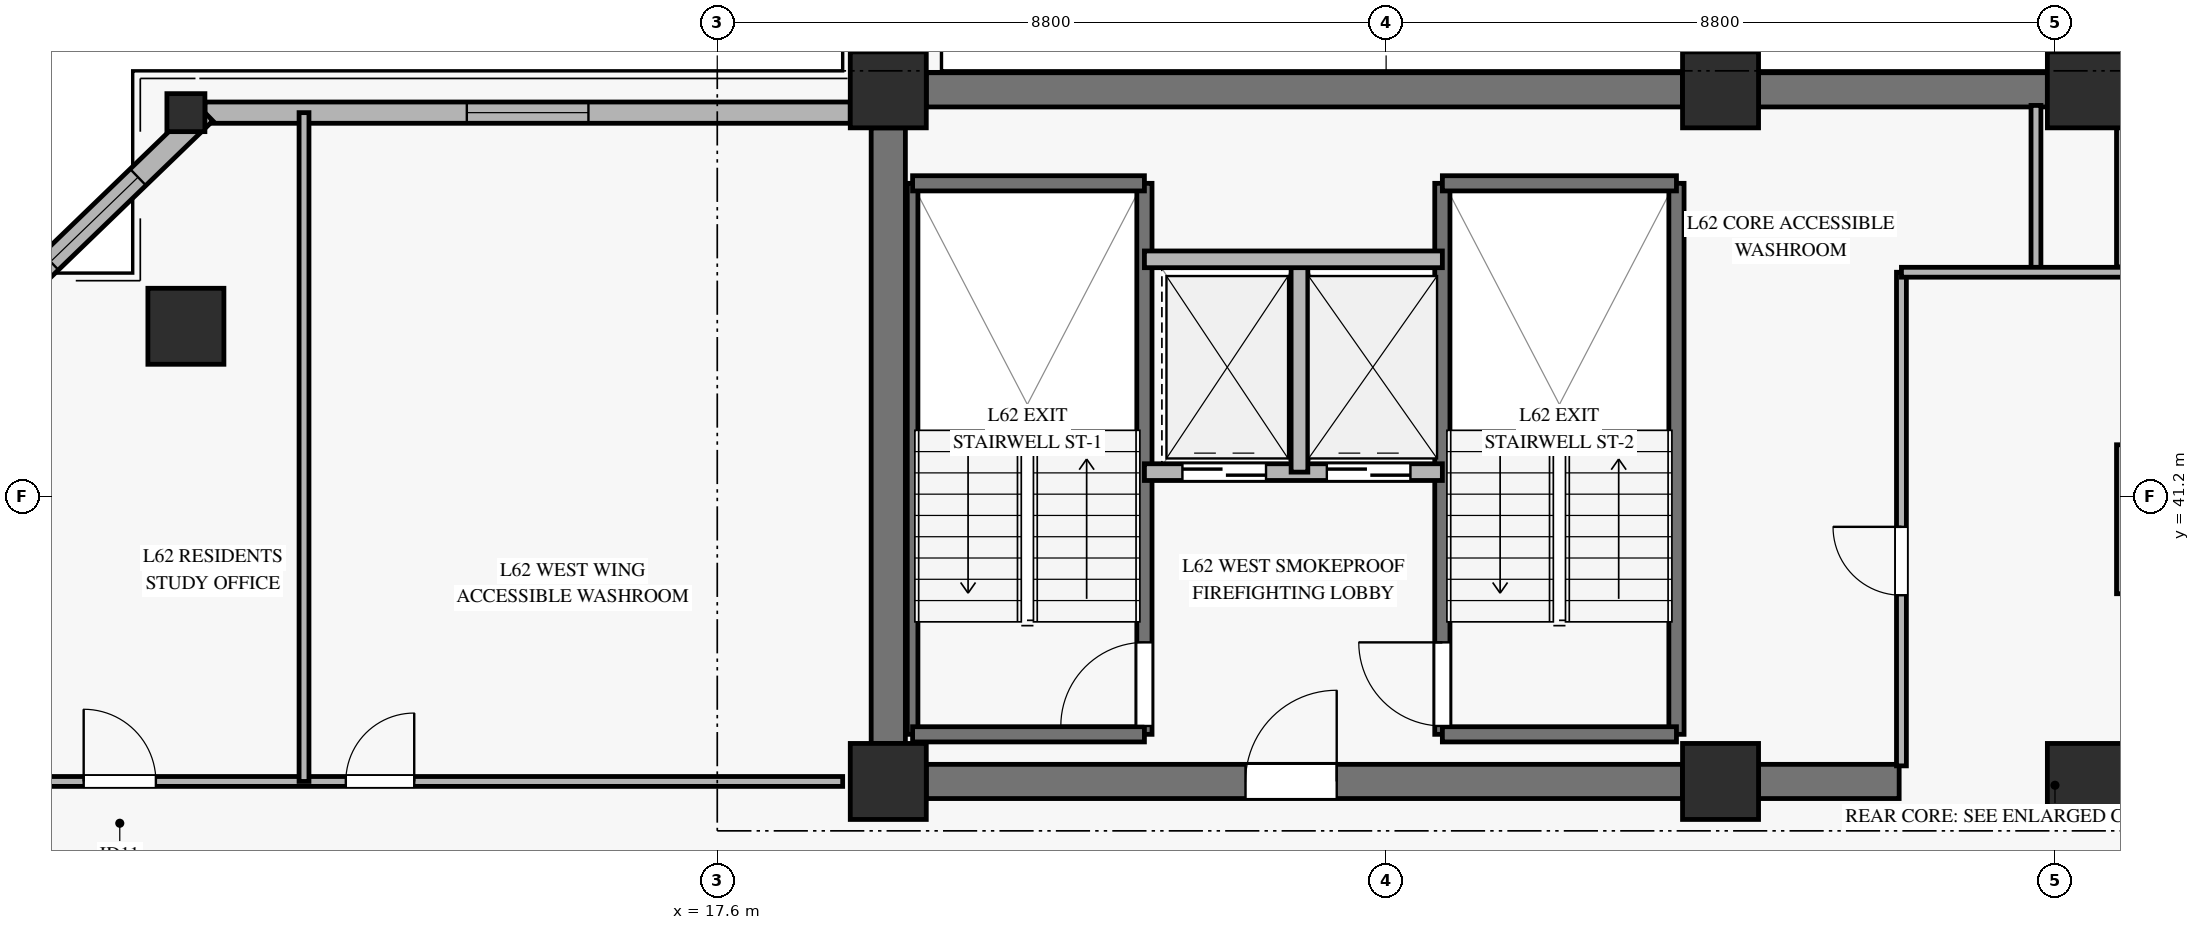
"""IFC4 building model, lengths in metres.
Left out: names, types, materials, properties, quantities, classifications, styles, units other than length and angle.
Written with IfcOpenShell. Run it as: python <this file> out.ifc"""

import sys

from ifc_helpers import new_model, si_unit, direction, frame, frame_2d, origin, origin_2d, place, context, subcontext, project, spatial, rectangle, hollow_rectangle, extrude, source, transform, mapped, element, fill, save


model = new_model("IFC4")
c1 = context("Model", 3, precision=1e-05, world=origin(), true_north=direction((0.0, 1.0)))
c2 = subcontext(c1, "Body", "Model", "MODEL_VIEW")
j1 = project(units=[si_unit("LENGTHUNIT", "METRE"), si_unit("PLANEANGLEUNIT", "RADIAN")], contexts=[c1])
p1 = place(None, origin())
s1 = spatial("IfcSite", under=j1, at=p1, CompositionType="ELEMENT")
p2 = place(p1, origin())
s2 = spatial("IfcBuilding", under=s1, at=p2, CompositionType="ELEMENT")
p3 = place(p2, frame((0.0, 0.0, 245.1)))
s3 = spatial("IfcBuildingStorey", under=s2, at=p3, CompositionType="ELEMENT", Elevation=245.1)
m1 = source(origin(), c2, "Body", "SweptSolid", [
    extrude(rectangle(XDim=1.0, YDim=1.0, at=origin_2d()), origin(), (0.0, 0.0, 1.0), 3.185),
])
for number, where, z_axis, x_axis in (
    (1, (19.85, 37.45, 0.0), (0.0, 0.0, 1.0), (1.0, 0.0, 0.0)),
    (2, (19.85, 46.55, 0.0), (0.0, 0.0, 1.0), (1.0, 0.0, 0.0)),
    (3, (30.8, 37.45, 0.0), (0.0, 0.0, 1.0), (1.0, 0.0, 0.0)),
    (4, (30.8, 46.55, 0.0), (0.0, 0.0, 1.0), (1.0, 0.0, 0.0)),
    (5, (35.6, 37.45, 0.0), (0.0, 0.0, 1.0), (1.0, 0.0, 0.0)),
    (6, (35.6, 46.55, 0.0), (0.0, 0.0, 1.0), (1.0, 0.0, 0.0)),
):
    element("IfcColumn", number, at=place(p3, frame(where, z_axis=z_axis, x_axis=x_axis)), inside=s3, PredefinedType="PILASTER", context=c2, shape_type="MappedRepresentation", body=[
        mapped(m1, transform((0.0, 0.0, 0.0), x_axis=(1.0, 0.0, 0.0), y_axis=(0.0, 1.0, 0.0), z_axis=(0.0, 0.0, 1.0), scale=1.0)),
    ])
p4 = place(p3, frame((20.35, 46.55, 0.0), z_axis=(0.0, 0.0, 1.0), x_axis=(1.0, 0.0, 0.0)))
e7 = element("IfcWall", 7, at=p4, inside=s3, PredefinedType="SHEAR", context=c2, shape_type="SweptSolid", body=[
    extrude(rectangle(XDim=9.95, YDim=0.45, at=frame_2d((4.975, 0.0))), origin(), (0.0, 0.0, 1.0), 3.185),
])
p5 = place(p3, frame((31.3, 46.55, 0.0), z_axis=(0.0, 0.0, 1.0), x_axis=(1.0, 0.0, 0.0)))
e8 = element("IfcWall", 8, at=p5, inside=s3, PredefinedType="SHEAR", context=c2, shape_type="SweptSolid", body=[
    extrude(rectangle(XDim=3.8, YDim=0.45, at=frame_2d((1.9, 0.0))), origin(), (0.0, 0.0, 1.0), 3.185),
])
p6 = place(p3, frame((20.35, 37.45, 0.0), z_axis=(0.0, 0.0, 1.0), x_axis=(1.0, 0.0, 0.0)))
e9 = element("IfcWall", 9, at=p6, inside=s3, PredefinedType="SHEAR", context=c2, shape_type="SweptSolid", body=[
    extrude(rectangle(XDim=9.95, YDim=0.45, at=frame_2d((4.975, 0.0))), origin(), (0.0, 0.0, 1.0), 3.185),
])
p7 = place(p6, frame((4.2, 0.0, 0.0)))
e10 = element("IfcOpeningElement", 10, at=p7, cuts=e9, PredefinedType="OPENING", context=c2, shape_type="SweptSolid", body=[
    extrude(rectangle(XDim=1.2, YDim=2.15, at=frame_2d((0.6, 1.075))), frame((0.0, 0.235, 0.0), z_axis=(0.0, -1.0, 0.0), x_axis=(1.0, 0.0, 0.0)), (0.0, 0.0, 1.0), 0.47),
])
p8 = place(p3, frame((31.3, 37.45, 0.0), z_axis=(0.0, 0.0, 1.0), x_axis=(1.0, 0.0, 0.0)))
e11 = element("IfcWall", 11, at=p8, inside=s3, PredefinedType="SHEAR", context=c2, shape_type="SweptSolid", body=[
    extrude(rectangle(XDim=1.85, YDim=0.45, at=frame_2d((0.925, 0.0))), origin(), (0.0, 0.0, 1.0), 3.185),
])
p9 = place(p3, frame((19.85, 37.95, 0.0), z_axis=(0.0, 0.0, 1.0), x_axis=(0.0, 1.0, 0.0)))
e12 = element("IfcWall", 12, at=p9, inside=s3, PredefinedType="SHEAR", context=c2, shape_type="SweptSolid", body=[
    extrude(rectangle(XDim=8.1, YDim=0.45, at=frame_2d((4.05, 0.0))), origin(), (0.0, 0.0, 1.0), 3.185),
])
m2 = source(origin(), c2, "Body", "SweptSolid", [
    extrude(hollow_rectangle(XDim=1.0, YDim=1.0, WallThickness=0.045, at=origin_2d()), origin(), (0.0, 0.0, 1.0), 3.207),
])
p10 = place(p3, frame((10.609, 43.439, 0.0), z_axis=(0.115424259294, 0.014389963725, 0.993212046499), x_axis=(-0.123712481455, 0.992318105212, 0.0)))
e13 = element("IfcColumn", 13, at=p10, inside=s3, PredefinedType="COLUMN", context=c2, shape_type="MappedRepresentation", body=[
    mapped(m2, transform((0.0, 0.0, 0.0), x_axis=(1.0, 0.0, 0.0), y_axis=(0.0, 1.0, 0.0), z_axis=(0.0, 0.0, 1.0), scale=1.0)),
])
m3 = source(origin(), c2, "Body", "SweptSolid", [
    extrude(hollow_rectangle(XDim=0.5, YDim=0.5, WallThickness=0.024, at=origin_2d()), origin(), (0.0, 0.0, 1.0), 3.206),
])
p11 = place(p3, frame((10.609, 46.25, 0.0), z_axis=(0.115436211662, 0.0, 0.993314895205), x_axis=(0.0, 1.0, 0.0)))
e14 = element("IfcColumn", 14, at=p11, inside=s3, PredefinedType="COLUMN", context=c2, shape_type="MappedRepresentation", body=[
    mapped(m3, transform((0.0, 0.0, 0.0), x_axis=(1.0, 0.0, 0.0), y_axis=(0.0, 1.0, 0.0), z_axis=(0.0, 0.0, 1.0), scale=1.0)),
])
p12 = place(p3, frame((10.859, 46.25, 0.0), z_axis=(0.0, 0.0, 1.0), x_axis=(1.0, 0.0, 0.0)))
e15 = element("IfcWall", 15, at=p12, inside=s3, PredefinedType="SOLIDWALL", context=c2, shape_type="SweptSolid", body=[
    extrude(rectangle(XDim=8.491, YDim=0.28, at=frame_2d((4.246, 0.0))), origin(), (0.0, 0.0, 1.0), 2.815),
])
p13 = place(p12, frame((3.446, 0.0, 0.45)))
e16 = element("IfcOpeningElement", 16, at=p13, cuts=e15, PredefinedType="OPENING", context=c2, shape_type="SweptSolid", body=[
    extrude(rectangle(XDim=1.6, YDim=2.0, at=frame_2d((0.8, 1.0))), frame((0.0, 0.15, 0.0), z_axis=(0.0, -1.0, 0.0), x_axis=(1.0, 0.0, 0.0)), (0.0, 0.0, 1.0), 0.3),
])
p14 = place(p3, frame((10.859, 46.25, 0.0), z_axis=(0.0, 0.0, 1.0), x_axis=(-0.719337004509, -0.694661265614, 0.0)))
e17 = element("IfcWall", 17, at=p14, inside=s3, PredefinedType="SOLIDWALL", context=c2, shape_type="SweptSolid", body=[
    extrude(rectangle(XDim=4.047, YDim=0.3, at=frame_2d((2.023, 0.0))), origin(), (0.0, 0.0, 1.0), 2.815),
])
p15 = place(p14, frame((1.223, 0.0, 0.45)))
e18 = element("IfcOpeningElement", 18, at=p15, cuts=e17, PredefinedType="OPENING", context=c2, shape_type="SweptSolid", body=[
    extrude(rectangle(XDim=1.6, YDim=2.0, at=frame_2d((0.8, 1.0))), frame((0.0, 0.16, 0.0), z_axis=(0.0, -1.0, 0.0), x_axis=(1.0, 0.0, 0.0)), (0.0, 0.0, 1.0), 0.32),
])
p16 = place(p3, frame((20.17, 38.07, 0.0), z_axis=(0.0, 0.0, 1.0), x_axis=(0.0, 1.0, 0.0)))
e19 = element("IfcWall", 19, at=p16, inside=s3, PredefinedType="SOLIDWALL", context=c2, shape_type="SweptSolid", body=[
    extrude(rectangle(XDim=7.25, YDim=0.14, at=frame_2d((3.625, 0.0))), origin(), (0.0, 0.0, 1.0), 3.4),
])
p17 = place(p3, frame((23.22, 38.07, 0.0), z_axis=(0.0, 0.0, 1.0), x_axis=(0.0, 1.0, 0.0)))
e20 = element("IfcWall", 20, at=p17, inside=s3, PredefinedType="SOLIDWALL", context=c2, shape_type="SweptSolid", body=[
    extrude(rectangle(XDim=7.25, YDim=0.2, at=frame_2d((3.625, 0.0))), origin(), (0.0, 0.0, 1.0), 3.4),
])
p18 = place(p17, frame((0.11, 0.0, 0.0)))
e21 = element("IfcOpeningElement", 21, at=p18, cuts=e20, PredefinedType="OPENING", context=c2, shape_type="SweptSolid", body=[
    extrude(rectangle(XDim=1.1, YDim=2.15, at=frame_2d((0.55, 1.075))), frame((0.0, 0.11, 0.0), z_axis=(0.0, -1.0, 0.0), x_axis=(1.0, 0.0, 0.0)), (0.0, 0.0, 1.0), 0.22),
])
for number, where, z_axis, x_axis in (
    (22, (20.17, 45.32, 0.0), (0.0, 0.0, 1.0), (1.0, 0.0, 0.0)),
    (23, (20.17, 38.07, 0.0), (0.0, 0.0, 1.0), (1.0, 0.0, 0.0)),
):
    element("IfcWall", number, at=place(p3, frame(where, z_axis=z_axis, x_axis=x_axis)), inside=s3, PredefinedType="SOLIDWALL", context=c2, shape_type="SweptSolid", body=[
        extrude(rectangle(XDim=3.05, YDim=0.2, at=frame_2d((1.525, 0.0))), origin(), (0.0, 0.0, 1.0), 3.4),
    ])
p19 = place(p3, frame((27.14, 38.07, 0.0), z_axis=(0.0, 0.0, 1.0), x_axis=(0.0, 1.0, 0.0)))
e24 = element("IfcWall", 24, at=p19, inside=s3, PredefinedType="SOLIDWALL", context=c2, shape_type="SweptSolid", body=[
    extrude(rectangle(XDim=7.25, YDim=0.2, at=frame_2d((3.625, 0.0))), origin(), (0.0, 0.0, 1.0), 3.4),
])
p20 = place(p19, frame((0.11, 0.0, 0.0)))
e25 = element("IfcOpeningElement", 25, at=p20, cuts=e24, PredefinedType="OPENING", context=c2, shape_type="SweptSolid", body=[
    extrude(rectangle(XDim=1.1, YDim=2.15, at=frame_2d((0.55, 1.075))), frame((0.0, 0.11, 0.0), z_axis=(0.0, -1.0, 0.0), x_axis=(1.0, 0.0, 0.0)), (0.0, 0.0, 1.0), 0.22),
])
p21 = place(p3, frame((30.22, 38.07, 0.0), z_axis=(0.0, 0.0, 1.0), x_axis=(0.0, 1.0, 0.0)))
e26 = element("IfcWall", 26, at=p21, inside=s3, PredefinedType="SOLIDWALL", context=c2, shape_type="SweptSolid", body=[
    extrude(rectangle(XDim=7.25, YDim=0.2, at=frame_2d((3.625, 0.0))), origin(), (0.0, 0.0, 1.0), 3.4),
])
for number, where, z_axis, x_axis in (
    (27, (27.14, 45.32, 0.0), (0.0, 0.0, 1.0), (1.0, 0.0, 0.0)),
    (28, (27.14, 38.07, 0.0), (0.0, 0.0, 1.0), (1.0, 0.0, 0.0)),
):
    element("IfcWall", number, at=place(p3, frame(where, z_axis=z_axis, x_axis=x_axis)), inside=s3, PredefinedType="SOLIDWALL", context=c2, shape_type="SweptSolid", body=[
        extrude(rectangle(XDim=3.08, YDim=0.2, at=frame_2d((1.54, 0.0))), origin(), (0.0, 0.0, 1.0), 3.4),
    ])
p22 = place(p3, frame((23.22, 41.52, 0.0), z_axis=(0.0, 0.0, 1.0), x_axis=(1.0, 0.0, 0.0)))
e29 = element("IfcWall", 29, at=p22, inside=s3, PredefinedType="SOLIDWALL", context=c2, shape_type="SweptSolid", body=[
    extrude(rectangle(XDim=3.92, YDim=0.22, at=frame_2d((1.96, 0.0))), origin(), (0.0, 0.0, 1.0), 3.185),
])
p23 = place(p22, frame((0.5, 0.0, 0.0)))
e30 = element("IfcOpeningElement", 30, at=p23, cuts=e29, PredefinedType="OPENING", context=c2, shape_type="SweptSolid", body=[
    extrude(rectangle(XDim=1.1, YDim=2.2, at=frame_2d((0.55, 1.1))), frame((0.0, 0.12, 0.0), z_axis=(0.0, -1.0, 0.0), x_axis=(1.0, 0.0, 0.0)), (0.0, 0.0, 1.0), 0.24),
])
p24 = place(p22, frame((2.4, 0.0, 0.0)))
e31 = element("IfcOpeningElement", 31, at=p24, cuts=e29, PredefinedType="OPENING", context=c2, shape_type="SweptSolid", body=[
    extrude(rectangle(XDim=1.1, YDim=2.2, at=frame_2d((0.55, 1.1))), frame((0.0, 0.12, 0.0), z_axis=(0.0, -1.0, 0.0), x_axis=(1.0, 0.0, 0.0)), (0.0, 0.0, 1.0), 0.24),
])
p25 = place(p3, frame((25.26, 41.52, 0.0), z_axis=(0.0, 0.0, 1.0), x_axis=(0.0, 1.0, 0.0)))
e32 = element("IfcWall", 32, at=p25, inside=s3, PredefinedType="SOLIDWALL", context=c2, shape_type="SweptSolid", body=[
    extrude(rectangle(XDim=2.8, YDim=0.22, at=frame_2d((1.4, 0.0))), origin(), (0.0, 0.0, 1.0), 3.185),
])
p26 = place(p3, frame((23.22, 44.32, 0.0), z_axis=(0.0, 0.0, 1.0), x_axis=(1.0, 0.0, 0.0)))
e33 = element("IfcWall", 33, at=p26, inside=s3, PredefinedType="SOLIDWALL", context=c2, shape_type="SweptSolid", body=[
    extrude(rectangle(XDim=3.92, YDim=0.22, at=frame_2d((1.96, 0.0))), origin(), (0.0, 0.0, 1.0), 3.185),
])
p27 = place(p3, frame((36.12, 39.92, 0.0), z_axis=(0.0, 0.0, 1.0), x_axis=(0.0, 1.0, 0.0)))
e34 = element("IfcWall", 34, at=p27, inside=s3, PredefinedType="SOLIDWALL", context=c2, shape_type="SweptSolid", body=[
    extrude(rectangle(XDim=1.96, YDim=0.22, at=frame_2d((0.98, 0.0))), origin(), (0.0, 0.0, 1.0), 3.185),
])
p28 = place(p3, frame((36.12, 44.22, 0.0), z_axis=(0.0, 0.0, 1.0), x_axis=(0.0, 1.0, 0.0)))
e35 = element("IfcWall", 35, at=p28, inside=s3, PredefinedType="SOLIDWALL", context=c2, shape_type="SweptSolid", body=[
    extrude(rectangle(XDim=2.125, YDim=0.22, at=frame_2d((1.062, 0.0))), origin(), (0.0, 0.0, 1.0), 3.185),
])
p29 = place(p3, frame((33.18, 37.655, 0.0), z_axis=(0.0, 0.0, 1.0), x_axis=(0.0, 1.0, 0.0)))
e36 = element("IfcWall", 36, at=p29, inside=s3, PredefinedType="PARTITIONING", context=c2, shape_type="SweptSolid", body=[
    extrude(rectangle(XDim=6.495, YDim=0.13, at=frame_2d((3.248, 0.0))), origin(), (0.0, 0.0, 1.0), 2.27),
])
p30 = place(p29, frame((2.245, 0.0, 0.0)))
e37 = element("IfcOpeningElement", 37, at=p30, cuts=e36, PredefinedType="OPENING", context=c2, shape_type="SweptSolid", body=[
    extrude(rectangle(XDim=0.9, YDim=2.1, at=frame_2d((0.45, 1.05))), frame((0.0, 0.075, 0.0), z_axis=(0.0, -1.0, 0.0), x_axis=(1.0, 0.0, 0.0)), (0.0, 0.0, 1.0), 0.15),
])
p31 = place(p3, frame((34.95, 44.15, 0.0), z_axis=(0.0, 0.0, 1.0), x_axis=(0.0, 1.0, 0.0)))
e38 = element("IfcWall", 38, at=p31, inside=s3, PredefinedType="PARTITIONING", context=c2, shape_type="SweptSolid", body=[
    extrude(rectangle(XDim=2.195, YDim=0.13, at=frame_2d((1.098, 0.0))), origin(), (0.0, 0.0, 1.0), 3.185),
])
p32 = place(p3, frame((33.18, 44.15, 0.0), z_axis=(0.0, 0.0, 1.0), x_axis=(1.0, 0.0, 0.0)))
e39 = element("IfcWall", 39, at=p32, inside=s3, PredefinedType="PARTITIONING", context=c2, shape_type="SweptSolid", body=[
    extrude(rectangle(XDim=2.94, YDim=0.13, at=frame_2d((1.47, 0.0))), origin(), (0.0, 0.0, 1.0), 2.47),
])
p33 = place(p3, frame((7.948, 37.45, 0.0), z_axis=(0.0, 0.0, 1.0), x_axis=(1.0, 0.0, 0.0)))
e40 = element("IfcWall", 40, at=p33, inside=s3, PredefinedType="PARTITIONING", context=c2, shape_type="SweptSolid", body=[
    extrude(rectangle(XDim=11.302, YDim=0.13, at=frame_2d((5.651, 0.0))), origin(), (0.0, 0.0, 1.0), 2.82),
])
p34 = place(p33, frame((1.316, 0.0, 0.0)))
e41 = element("IfcOpeningElement", 41, at=p34, cuts=e40, PredefinedType="OPENING", context=c2, shape_type="SweptSolid", body=[
    extrude(rectangle(XDim=0.95, YDim=2.1, at=frame_2d((0.475, 1.05))), frame((0.0, 0.075, 0.0), z_axis=(0.0, -1.0, 0.0), x_axis=(1.0, 0.0, 0.0)), (0.0, 0.0, 1.0), 0.15),
])
p35 = place(p33, frame((4.765, 0.0, 0.0)))
e42 = element("IfcOpeningElement", 42, at=p35, cuts=e40, PredefinedType="OPENING", context=c2, shape_type="SweptSolid", body=[
    extrude(rectangle(XDim=0.9, YDim=2.1, at=frame_2d((0.45, 1.05))), frame((0.0, 0.075, 0.0), z_axis=(0.0, -1.0, 0.0), x_axis=(1.0, 0.0, 0.0)), (0.0, 0.0, 1.0), 0.15),
])
p36 = place(p3, frame((12.163, 37.45, 0.0), z_axis=(0.0, 0.0, 1.0), x_axis=(0.0, 1.0, 0.0)))
e43 = element("IfcWall", 43, at=p36, inside=s3, PredefinedType="PARTITIONING", context=c2, shape_type="SweptSolid", body=[
    extrude(rectangle(XDim=8.8, YDim=0.13, at=frame_2d((4.4, 0.0))), origin(), (0.0, 0.0, 1.0), 3.185),
])
m4 = source(origin(), c2, "Body", "SweptSolid", [
    extrude(rectangle(XDim=1.6, YDim=2.0, at=frame_2d((0.8, 1.0))), frame((0.0, 0.03, 0.0), z_axis=(0.0, -1.0, 0.0), x_axis=(1.0, 0.0, 0.0)), (0.0, 0.0, 1.0), 0.06),
])
p37 = place(p13, origin())
e44 = element("IfcWindow", 44, at=p37, inside=s3, PartitioningType="SINGLE_PANEL", PredefinedType="WINDOW", context=c2, shape_type="MappedRepresentation", body=[
    mapped(m4, transform((0.0, 0.0, 0.0), x_axis=(1.0, 0.0, 0.0), y_axis=(0.0, 1.0, 0.0), z_axis=(0.0, 0.0, 1.0), scale=1.0)),
])
fill(e16, e44)
p38 = place(p15, origin())
e45 = element("IfcWindow", 45, at=p38, inside=s3, PartitioningType="SINGLE_PANEL", PredefinedType="WINDOW", context=c2, shape_type="MappedRepresentation", body=[
    mapped(m4, transform((0.0, 0.0, 0.0), x_axis=(1.0, 0.0, 0.0), y_axis=(0.0, 1.0, 0.0), z_axis=(0.0, 0.0, 1.0), scale=1.0)),
])
fill(e18, e45)
m5 = source(origin(), c2, "Body", "SweptSolid", [
    extrude(rectangle(XDim=1.1, YDim=2.15, at=frame_2d((0.55, 1.075))), frame((0.0, 0.025, 0.0), z_axis=(0.0, -1.0, 0.0), x_axis=(1.0, 0.0, 0.0)), (0.0, 0.0, 1.0), 0.05),
])
p39 = place(p18, origin())
e46 = element("IfcDoor", 46, at=p39, inside=s3, OperationType="SINGLE_SWING_LEFT", PredefinedType="DOOR", context=c2, shape_type="MappedRepresentation", body=[
    mapped(m5, transform((0.0, 0.0, 0.0), x_axis=(1.0, 0.0, 0.0), y_axis=(0.0, 1.0, 0.0), z_axis=(0.0, 0.0, 1.0), scale=1.0)),
])
fill(e21, e46)
p40 = place(p20, origin())
e47 = element("IfcDoor", 47, at=p40, inside=s3, OperationType="SINGLE_SWING_RIGHT", PredefinedType="DOOR", context=c2, shape_type="MappedRepresentation", body=[
    mapped(m5, transform((0.0, 0.0, 0.0), x_axis=(1.0, 0.0, 0.0), y_axis=(0.0, 1.0, 0.0), z_axis=(0.0, 0.0, 1.0), scale=1.0)),
])
fill(e25, e47)
m6 = source(origin(), c2, "Body", "SweptSolid", [
    extrude(rectangle(XDim=1.1, YDim=2.2, at=frame_2d((0.55, 1.1))), frame((0.0, 0.025, 0.0), z_axis=(0.0, -1.0, 0.0), x_axis=(1.0, 0.0, 0.0)), (0.0, 0.0, 1.0), 0.05),
])
p41 = place(p23, origin())
e48 = element("IfcDoor", 48, at=p41, inside=s3, OperationType="SLIDING_TO_LEFT", PredefinedType="DOOR", context=c2, shape_type="MappedRepresentation", body=[
    mapped(m6, transform((0.0, 0.0, 0.0), x_axis=(1.0, 0.0, 0.0), y_axis=(0.0, 1.0, 0.0), z_axis=(0.0, 0.0, 1.0), scale=1.0)),
])
fill(e30, e48)
p42 = place(p24, origin())
e49 = element("IfcDoor", 49, at=p42, inside=s3, OperationType="SLIDING_TO_LEFT", PredefinedType="DOOR", context=c2, shape_type="MappedRepresentation", body=[
    mapped(m6, transform((0.0, 0.0, 0.0), x_axis=(1.0, 0.0, 0.0), y_axis=(0.0, 1.0, 0.0), z_axis=(0.0, 0.0, 1.0), scale=1.0)),
])
fill(e31, e49)
m7 = source(origin(), c2, "Body", "SweptSolid", [
    extrude(rectangle(XDim=1.2, YDim=2.15, at=frame_2d((0.6, 1.075))), frame((0.0, 0.025, 0.0), z_axis=(0.0, -1.0, 0.0), x_axis=(1.0, 0.0, 0.0)), (0.0, 0.0, 1.0), 0.05),
])
p43 = place(p7, origin())
e50 = element("IfcDoor", 50, at=p43, inside=s3, OperationType="SINGLE_SWING_RIGHT", PredefinedType="DOOR", context=c2, shape_type="MappedRepresentation", body=[
    mapped(m7, transform((0.0, 0.0, 0.0), x_axis=(1.0, 0.0, 0.0), y_axis=(0.0, 1.0, 0.0), z_axis=(0.0, 0.0, 1.0), scale=1.0)),
])
fill(e10, e50)
m8 = source(origin(), c2, "Body", "SweptSolid", [
    extrude(rectangle(XDim=0.9, YDim=2.1, at=frame_2d((0.45, 1.05))), frame((0.0, 0.025, 0.0), z_axis=(0.0, -1.0, 0.0), x_axis=(1.0, 0.0, 0.0)), (0.0, 0.0, 1.0), 0.05),
])
p44 = place(p30, origin())
e51 = element("IfcDoor", 51, at=p44, inside=s3, OperationType="SINGLE_SWING_RIGHT", PredefinedType="DOOR", context=c2, shape_type="MappedRepresentation", body=[
    mapped(m8, transform((0.0, 0.0, 0.0), x_axis=(1.0, 0.0, 0.0), y_axis=(0.0, 1.0, 0.0), z_axis=(0.0, 0.0, 1.0), scale=1.0)),
])
fill(e37, e51)
m9 = source(origin(), c2, "Body", "SweptSolid", [
    extrude(rectangle(XDim=0.95, YDim=2.1, at=frame_2d((0.475, 1.05))), frame((0.0, 0.025, 0.0), z_axis=(0.0, -1.0, 0.0), x_axis=(1.0, 0.0, 0.0)), (0.0, 0.0, 1.0), 0.05),
])
p45 = place(p34, origin())
e52 = element("IfcDoor", 52, at=p45, inside=s3, OperationType="SINGLE_SWING_LEFT", PredefinedType="DOOR", context=c2, shape_type="MappedRepresentation", body=[
    mapped(m9, transform((0.0, 0.0, 0.0), x_axis=(1.0, 0.0, 0.0), y_axis=(0.0, 1.0, 0.0), z_axis=(0.0, 0.0, 1.0), scale=1.0)),
])
fill(e41, e52)
p46 = place(p35, origin())
e53 = element("IfcDoor", 53, at=p46, inside=s3, OperationType="SINGLE_SWING_RIGHT", PredefinedType="DOOR", context=c2, shape_type="MappedRepresentation", body=[
    mapped(m8, transform((0.0, 0.0, 0.0), x_axis=(1.0, 0.0, 0.0), y_axis=(0.0, 1.0, 0.0), z_axis=(0.0, 0.0, 1.0), scale=1.0)),
])
fill(e42, e53)
save(model, sys.argv[1])
